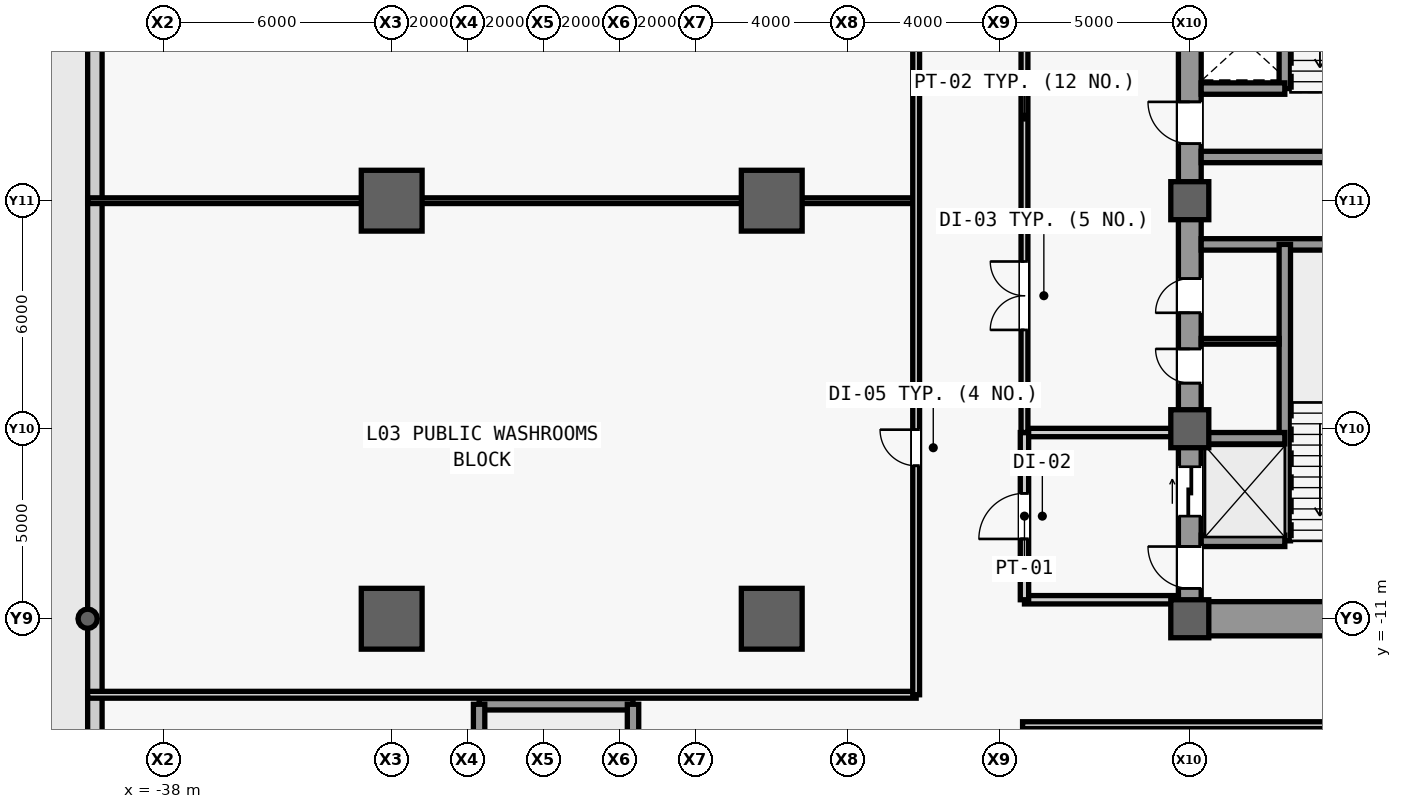
"""IFC4 building model, lengths in metres.
Left out: names, types, materials, properties, quantities, classifications, styles, units other than length and angle.
Written with IfcOpenShell. Run it as: python <this file> out.ifc"""

import sys

from ifc_helpers import new_model, si_unit, direction, frame, frame_2d, origin, origin_2d, place, context, subcontext, project, spatial, rectangle, hollow_circle, extrude, source, transform, mapped, element, fill, save


model = new_model("IFC4")
c1 = context("Model", 3, precision=1e-05, world=origin(), true_north=direction((0.0, 1.0)))
c2 = subcontext(c1, "Body", "Model", "MODEL_VIEW")
j1 = project(units=[si_unit("LENGTHUNIT", "METRE"), si_unit("PLANEANGLEUNIT", "RADIAN")], contexts=[c1])
p1 = place(None, origin())
s1 = spatial("IfcSite", under=j1, at=p1, CompositionType="ELEMENT")
p2 = place(p1, origin())
s2 = spatial("IfcBuilding", under=s1, at=p2, CompositionType="ELEMENT")
p3 = place(p2, frame((0.0, 0.0, 17.4)))
s3 = spatial("IfcBuildingStorey", under=s2, at=p3, CompositionType="ELEMENT", Elevation=17.4)
m1 = source(origin(), c2, "Body", "SweptSolid", [
    extrude(rectangle(XDim=22.0, YDim=0.6, at=frame_2d((11.0, 0.0))), origin(), (0.0, 0.0, 1.0), 4.48),
])
p4 = place(p3, frame((-11.0, -11.0, 0.0), z_axis=(0.0, 0.0, 1.0), x_axis=(0.0, 1.0, 0.0)))
e1 = element("IfcWall", 1, at=p4, inside=s3, PredefinedType="SHEAR", context=c2, shape_type="MappedRepresentation", body=[
    mapped(m1, transform((0.0, 0.0, 0.0), scale=1.0)),
])
m2 = source(origin(), c2, "Body", "SweptSolid", [
    extrude(rectangle(XDim=1.1, YDim=2.2, at=frame_2d((0.55, 1.1))), frame((0.0, 0.31, 0.0), z_axis=(0.0, -1.0, 0.0), x_axis=(1.0, 0.0, 0.0)), (0.0, 0.0, 1.0), 0.62),
])
p5 = place(p4, frame((0.8, 0.0, 0.0)))
e2 = element("IfcOpeningElement", 2, at=p5, cuts=e1, PredefinedType="OPENING", context=c2, shape_type="MappedRepresentation", body=[
    mapped(m2, transform((0.0, 0.0, 0.0), scale=1.0)),
])
p6 = place(p4, frame((12.5, 0.0, 0.0)))
e3 = element("IfcOpeningElement", 3, at=p6, cuts=e1, PredefinedType="OPENING", context=c2, shape_type="MappedRepresentation", body=[
    mapped(m2, transform((0.0, 0.0, 0.0), scale=1.0)),
])
m3 = source(origin(), c2, "Body", "SweptSolid", [
    extrude(rectangle(XDim=0.9, YDim=2.15, at=frame_2d((0.45, 1.075))), frame((0.0, 0.31, 0.0), z_axis=(0.0, -1.0, 0.0), x_axis=(1.0, 0.0, 0.0)), (0.0, 0.0, 1.0), 0.62),
])
p7 = place(p4, frame((6.2, 0.0, 0.0)))
e4 = element("IfcOpeningElement", 4, at=p7, cuts=e1, PredefinedType="OPENING", context=c2, shape_type="MappedRepresentation", body=[
    mapped(m3, transform((0.0, 0.0, 0.0), scale=1.0)),
])
p8 = place(p4, frame((8.05, 0.0, 0.0)))
e5 = element("IfcOpeningElement", 5, at=p8, cuts=e1, PredefinedType="OPENING", context=c2, shape_type="MappedRepresentation", body=[
    mapped(m3, transform((0.0, 0.0, 0.0), scale=1.0)),
])
m4 = source(origin(), c2, "Body", "SweptSolid", [
    extrude(rectangle(XDim=1.3, YDim=2.3, at=frame_2d((0.65, 1.15))), frame((0.0, 0.31, 0.0), z_axis=(0.0, -1.0, 0.0), x_axis=(1.0, 0.0, 0.0)), (0.0, 0.0, 1.0), 0.62),
])
p9 = place(p4, frame((2.7, 0.0, 0.0)))
e6 = element("IfcOpeningElement", 6, at=p9, cuts=e1, PredefinedType="OPENING", context=c2, shape_type="MappedRepresentation", body=[
    mapped(m4, transform((0.0, 0.0, 0.0), scale=1.0)),
])
m5 = source(origin(), c2, "Body", "SweptSolid", [
    extrude(rectangle(XDim=5.85, YDim=0.9, at=frame_2d((2.925, 0.0))), origin(), (0.0, 0.0, 1.0), 4.48),
])
p10 = place(p3, frame((-10.7, -11.0, 0.0), z_axis=(0.0, 0.0, 1.0), x_axis=(1.0, 0.0, 0.0)))
e7 = element("IfcWall", 7, at=p10, inside=s3, PredefinedType="SHEAR", context=c2, shape_type="MappedRepresentation", body=[
    mapped(m5, transform((0.0, 0.0, 0.0), scale=1.0)),
])
m6 = source(origin(), c2, "Body", "SweptSolid", [
    extrude(rectangle(XDim=5.6, YDim=0.3, at=frame_2d((2.8, 0.0))), origin(), (0.0, 0.0, 1.0), 4.48),
])
for number, where, z_axis, x_axis in (
    (8, (-10.7, -1.15, 0.0), (0.0, 0.0, 1.0), (1.0, 0.0, 0.0)),
    (9, (-10.7, 1.15, 0.0), (0.0, 0.0, 1.0), (1.0, 0.0, 0.0)),
):
    element("IfcWall", number, at=place(p3, frame(where, z_axis=z_axis, x_axis=x_axis)), inside=s3, PredefinedType="SHEAR", context=c2, shape_type="MappedRepresentation", body=[
        mapped(m6, transform((0.0, 0.0, 0.0), scale=1.0)),
    ])
m7 = source(origin(), c2, "Body", "SweptSolid", [
    extrude(hollow_circle(Radius=0.254, WallThickness=0.025, at=origin_2d()), origin(), (0.0, 0.0, 1.0), 4.8),
])
p11 = place(p3, frame((-40.0, -11.0, 0.0), z_axis=(0.0, 0.0, 1.0), x_axis=(1.0, 0.0, 0.0)))
e10 = element("IfcColumn", 10, at=p11, inside=s3, PredefinedType="COLUMN", context=c2, shape_type="MappedRepresentation", body=[
    mapped(m7, transform((0.0, 0.0, 0.0), scale=1.0)),
])
m8 = source(origin(), c2, "Body", "SweptSolid", [
    extrude(rectangle(XDim=1.6, YDim=1.6, at=origin_2d()), origin(), (0.0, 0.0, 1.0), 4.8),
])
for number, where, z_axis, x_axis in (
    (11, (-32.0, -11.0, 0.0), (0.0, 0.0, 1.0), (1.0, 0.0, 0.0)),
    (12, (-32.0, 0.0, 0.0), (0.0, 0.0, 1.0), (1.0, 0.0, 0.0)),
    (13, (-22.0, -11.0, 0.0), (0.0, 0.0, 1.0), (1.0, 0.0, 0.0)),
    (14, (-22.0, 0.0, 0.0), (0.0, 0.0, 1.0), (1.0, 0.0, 0.0)),
):
    element("IfcColumn", number, at=place(p3, frame(where, z_axis=z_axis, x_axis=x_axis)), inside=s3, PredefinedType="COLUMN", context=c2, shape_type="MappedRepresentation", body=[
        mapped(m8, transform((0.0, 0.0, 0.0), scale=1.0)),
    ])
m9 = source(origin(), c2, "Body", "SweptSolid", [
    extrude(rectangle(XDim=1.0, YDim=1.0, at=origin_2d()), origin(), (0.0, 0.0, 1.0), 4.8),
])
for number, where, z_axis, x_axis in (
    (15, (-11.0, -11.0, 0.0), (0.0, 0.0, 1.0), (1.0, 0.0, 0.0)),
    (16, (-11.0, -6.0, 0.0), (0.0, 0.0, 1.0), (1.0, 0.0, 0.0)),
    (17, (-11.0, 0.0, 0.0), (0.0, 0.0, 1.0), (1.0, 0.0, 0.0)),
):
    element("IfcColumn", number, at=place(p3, frame(where, z_axis=z_axis, x_axis=x_axis)), inside=s3, PredefinedType="COLUMN", context=c2, shape_type="MappedRepresentation", body=[
        mapped(m9, transform((0.0, 0.0, 0.0), scale=1.0)),
    ])
m10 = source(origin(), c2, "Body", "SweptSolid", [
    extrude(rectangle(XDim=69.24, YDim=0.38, at=frame_2d((34.62, 0.0))), origin(), (0.0, 0.0, 1.0), 2.68),
])
p12 = place(p3, frame((-39.81, -34.62, 0.0), z_axis=(0.0, 0.0, 1.0), x_axis=(0.0, 1.0, 0.0)))
e18 = element("IfcWall", 18, at=p12, inside=s3, PredefinedType="STANDARD", context=c2, shape_type="MappedRepresentation", body=[
    mapped(m10, transform((0.0, 0.0, 0.0), scale=1.0)),
])
m11 = source(origin(), c2, "Body", "SweptSolid", [
    extrude(rectangle(XDim=1.6, YDim=2.25, at=frame_2d((0.8, 1.125))), frame((0.0, 0.2, 0.0), z_axis=(0.0, -1.0, 0.0), x_axis=(1.0, 0.0, 0.0)), (0.0, 0.0, 1.0), 0.4),
])
p13 = place(p12, frame((39.82, 0.0, 0.0)))
e19 = element("IfcOpeningElement", 19, at=p13, cuts=e18, PredefinedType="OPENING", context=c2, shape_type="MappedRepresentation", body=[
    mapped(m11, transform((0.0, 0.0, 0.0), scale=1.0)),
])
m12 = source(origin(), c2, "Body", "SweptSolid", [
    extrude(rectangle(XDim=1.6, YDim=1.96, at=frame_2d((0.8, 0.98))), frame((0.0, 0.2, 0.0), z_axis=(0.0, -1.0, 0.0), x_axis=(1.0, 0.0, 0.0)), (0.0, 0.0, 1.0), 0.4),
])
p14 = place(p12, frame((16.51, 0.0, 0.5)))
e20 = element("IfcOpeningElement", 20, at=p14, cuts=e18, PredefinedType="OPENING", context=c2, shape_type="MappedRepresentation", body=[
    mapped(m12, transform((0.0, 0.0, 0.0), scale=1.0)),
])
p15 = place(p12, frame((51.13, 0.0, 0.5)))
e21 = element("IfcOpeningElement", 21, at=p15, cuts=e18, PredefinedType="OPENING", context=c2, shape_type="MappedRepresentation", body=[
    mapped(m12, transform((0.0, 0.0, 0.0), scale=1.0)),
])
m13 = source(origin(), c2, "Body", "SweptSolid", [
    extrude(rectangle(XDim=7.8, YDim=0.3, at=frame_2d((3.9, 0.0))), origin(), (0.0, 0.0, 1.0), 4.48),
])
p16 = place(p3, frame((-8.5, -8.95, 0.0), z_axis=(0.0, 0.0, 1.0), x_axis=(0.0, 1.0, 0.0)))
e22 = element("IfcWall", 22, at=p16, inside=s3, PredefinedType="SHEAR", context=c2, shape_type="MappedRepresentation", body=[
    mapped(m13, transform((0.0, 0.0, 0.0), scale=1.0)),
])
m14 = source(origin(), c2, "Body", "SweptSolid", [
    extrude(rectangle(XDim=2.2, YDim=0.3, at=frame_2d((1.1, 0.0))), origin(), (0.0, 0.0, 1.0), 4.48),
])
for number, where, z_axis, x_axis in (
    (23, (-10.7, -8.95, 0.0), (0.0, 0.0, 1.0), (1.0, 0.0, 0.0)),
    (24, (-10.7, -6.25, 0.0), (0.0, 0.0, 1.0), (1.0, 0.0, 0.0)),
):
    element("IfcWall", number, at=place(p3, frame(where, z_axis=z_axis, x_axis=x_axis)), inside=s3, PredefinedType="SHEAR", context=c2, shape_type="MappedRepresentation", body=[
        mapped(m14, transform((0.0, 0.0, 0.0), scale=1.0)),
    ])
m15 = source(origin(), c2, "Body", "SweptSolid", [
    extrude(rectangle(XDim=7.75, YDim=0.3, at=frame_2d((3.875, 0.0))), origin(), (0.0, 0.0, 1.0), 4.48),
])
p17 = place(p3, frame((-8.5, 2.95, 0.0), z_axis=(0.0, 0.0, 1.0), x_axis=(0.0, 1.0, 0.0)))
e25 = element("IfcWall", 25, at=p17, inside=s3, PredefinedType="SHEAR", context=c2, shape_type="MappedRepresentation", body=[
    mapped(m15, transform((0.0, 0.0, 0.0), scale=1.0)),
])
p18 = place(p3, frame((-10.7, 2.95, 0.0), z_axis=(0.0, 0.0, 1.0), x_axis=(1.0, 0.0, 0.0)))
e26 = element("IfcWall", 26, at=p18, inside=s3, PredefinedType="SHEAR", context=c2, shape_type="MappedRepresentation", body=[
    mapped(m14, transform((0.0, 0.0, 0.0), scale=1.0)),
])
m16 = source(origin(), c2, "Body", "SweptSolid", [
    extrude(rectangle(XDim=2.05, YDim=0.15, at=frame_2d((1.025, 0.0))), origin(), (0.0, 0.0, 1.0), 4.48),
])
p19 = place(p3, frame((-10.7, -3.7, 0.0), z_axis=(0.0, 0.0, 1.0), x_axis=(1.0, 0.0, 0.0)))
e27 = element("IfcWall", 27, at=p19, inside=s3, PredefinedType="PARTITIONING", context=c2, shape_type="MappedRepresentation", body=[
    mapped(m16, transform((0.0, 0.0, 0.0), scale=1.0)),
])
m17 = source(origin(), c2, "Body", "SweptSolid", [
    extrude(rectangle(XDim=4.05, YDim=0.22, at=frame_2d((2.025, 0.0))), origin(), (0.0, 0.0, 1.0), 4.48),
])
for number, where, z_axis, x_axis in (
    (28, (-15.35, -10.5, 0.0), (0.0, 0.0, 1.0), (1.0, 0.0, 0.0)),
    (29, (-15.35, -6.1, 0.0), (0.0, 0.0, 1.0), (1.0, 0.0, 0.0)),
):
    element("IfcWall", number, at=place(p3, frame(where, z_axis=z_axis, x_axis=x_axis)), inside=s3, PredefinedType="PARTITIONING", context=c2, shape_type="MappedRepresentation", body=[
        mapped(m17, transform((0.0, 0.0, 0.0), scale=1.0)),
    ])
m18 = source(origin(), c2, "Body", "SweptSolid", [
    extrude(rectangle(XDim=4.4, YDim=0.22, at=frame_2d((2.2, 0.0))), origin(), (0.0, 0.0, 1.0), 4.48),
])
p20 = place(p3, frame((-15.35, -10.5, 0.0), z_axis=(0.0, 0.0, 1.0), x_axis=(0.0, 1.0, 0.0)))
e30 = element("IfcWall", 30, at=p20, inside=s3, PredefinedType="PARTITIONING", context=c2, shape_type="MappedRepresentation", body=[
    mapped(m18, transform((0.0, 0.0, 0.0), scale=1.0)),
])
m19 = source(origin(), c2, "Body", "SweptSolid", [
    extrude(rectangle(XDim=1.2, YDim=2.2, at=frame_2d((0.6, 1.1))), frame((0.0, 0.12, 0.0), z_axis=(0.0, -1.0, 0.0), x_axis=(1.0, 0.0, 0.0)), (0.0, 0.0, 1.0), 0.24),
])
p21 = place(p20, frame((1.6, 0.0, 0.0)))
e31 = element("IfcOpeningElement", 31, at=p21, cuts=e30, PredefinedType="OPENING", context=c2, shape_type="MappedRepresentation", body=[
    mapped(m19, transform((0.0, 0.0, 0.0), scale=1.0)),
])
m20 = source(origin(), c2, "Body", "SweptSolid", [
    extrude(rectangle(XDim=16.6, YDim=0.18, at=frame_2d((8.3, 0.0))), origin(), (0.0, 0.0, 1.0), 4.48),
])
p22 = place(p3, frame((-15.35, -6.1, 0.0), z_axis=(0.0, 0.0, 1.0), x_axis=(0.0, 1.0, 0.0)))
e32 = element("IfcWall", 32, at=p22, inside=s3, PredefinedType="PARTITIONING", context=c2, shape_type="MappedRepresentation", body=[
    mapped(m20, transform((0.0, 0.0, 0.0), scale=1.0)),
])
m21 = source(origin(), c2, "Body", "SweptSolid", [
    extrude(rectangle(XDim=1.8, YDim=2.25, at=frame_2d((0.9, 1.125))), frame((0.0, 0.1, 0.0), z_axis=(0.0, -1.0, 0.0), x_axis=(1.0, 0.0, 0.0)), (0.0, 0.0, 1.0), 0.2),
])
p23 = place(p22, frame((2.7, 0.0, 0.0)))
e33 = element("IfcOpeningElement", 33, at=p23, cuts=e32, PredefinedType="OPENING", context=c2, shape_type="MappedRepresentation", body=[
    mapped(m21, transform((0.0, 0.0, 0.0), scale=1.0)),
])
p24 = place(p22, frame((11.0, 0.0, 0.0)))
e34 = element("IfcOpeningElement", 34, at=p24, cuts=e32, PredefinedType="OPENING", context=c2, shape_type="MappedRepresentation", body=[
    mapped(m21, transform((0.0, 0.0, 0.0), scale=1.0)),
])
m22 = source(origin(), c2, "Body", "SweptSolid", [
    extrude(rectangle(XDim=4.05, YDim=0.3, at=frame_2d((2.025, 0.0))), origin(), (0.0, 0.0, 1.0), 4.48),
])
p25 = place(p3, frame((-29.7, -13.25, 0.0), z_axis=(0.0, 0.0, 1.0), x_axis=(1.0, 0.0, 0.0)))
e35 = element("IfcWall", 35, at=p25, inside=s3, PredefinedType="SHEAR", context=c2, shape_type="MappedRepresentation", body=[
    mapped(m22, transform((0.0, 0.0, 0.0), scale=1.0)),
])
m23 = source(origin(), c2, "Body", "SweptSolid", [
    extrude(rectangle(XDim=10.5, YDim=0.3, at=frame_2d((5.25, 0.0))), origin(), (0.0, 0.0, 1.0), 4.48),
])
for number, where, z_axis, x_axis in (
    (36, (-29.7, -23.75, 0.0), (0.0, 0.0, 1.0), (0.0, 1.0, 0.0)),
    (37, (-25.65, -23.75, 0.0), (0.0, 0.0, 1.0), (0.0, 1.0, 0.0)),
):
    element("IfcWall", number, at=place(p3, frame(where, z_axis=z_axis, x_axis=x_axis)), inside=s3, PredefinedType="SHEAR", context=c2, shape_type="MappedRepresentation", body=[
        mapped(m23, transform((0.0, 0.0, 0.0), scale=1.0)),
    ])
m24 = source(origin(), c2, "Body", "SweptSolid", [
    extrude(rectangle(XDim=30.8, YDim=0.18, at=frame_2d((15.4, 0.0))), origin(), (0.0, 0.0, 1.0), 4.48),
])
p26 = place(p3, frame((-15.4, -13.8, 0.0), z_axis=(0.0, 0.0, 1.0), x_axis=(1.0, 0.0, 0.0)))
e38 = element("IfcWall", 38, at=p26, inside=s3, PredefinedType="PARTITIONING", context=c2, shape_type="MappedRepresentation", body=[
    mapped(m24, transform((0.0, 0.0, 0.0), scale=1.0)),
])
p27 = place(p26, frame((14.5, 0.0, 0.0)))
e39 = element("IfcOpeningElement", 39, at=p27, cuts=e38, PredefinedType="OPENING", context=c2, shape_type="MappedRepresentation", body=[
    mapped(m21, transform((0.0, 0.0, 0.0), scale=1.0)),
])
m25 = source(origin(), c2, "Body", "SweptSolid", [
    extrude(rectangle(XDim=21.8, YDim=0.18, at=frame_2d((10.9, 0.0))), origin(), (0.0, 0.0, 1.0), 4.48),
])
p28 = place(p3, frame((-40.0, -13.0, 0.0), z_axis=(0.0, 0.0, 1.0), x_axis=(1.0, 0.0, 0.0)))
e40 = element("IfcWall", 40, at=p28, inside=s3, PredefinedType="PARTITIONING", context=c2, shape_type="MappedRepresentation", body=[
    mapped(m25, transform((0.0, 0.0, 0.0), scale=1.0)),
])
m26 = source(origin(), c2, "Body", "SweptSolid", [
    extrude(rectangle(XDim=21.8, YDim=0.15, at=frame_2d((10.9, 0.0))), origin(), (0.0, 0.0, 1.0), 2.68),
])
p29 = place(p3, frame((-40.0, 0.0, 0.0), z_axis=(0.0, 0.0, 1.0), x_axis=(1.0, 0.0, 0.0)))
e41 = element("IfcWall", 41, at=p29, inside=s3, PredefinedType="PARTITIONING", context=c2, shape_type="MappedRepresentation", body=[
    mapped(m26, transform((0.0, 0.0, 0.0), scale=1.0)),
])
m27 = source(origin(), c2, "Body", "SweptSolid", [
    extrude(rectangle(XDim=24.3, YDim=0.18, at=frame_2d((12.15, 0.0))), origin(), (0.0, 0.0, 1.0), 4.48),
])
p30 = place(p3, frame((-18.2, -13.0, 0.0), z_axis=(0.0, 0.0, 1.0), x_axis=(0.0, 1.0, 0.0)))
e42 = element("IfcWall", 42, at=p30, inside=s3, PredefinedType="PARTITIONING", context=c2, shape_type="MappedRepresentation", body=[
    mapped(m27, transform((0.0, 0.0, 0.0), scale=1.0)),
])
m28 = source(origin(), c2, "Body", "SweptSolid", [
    extrude(rectangle(XDim=0.95, YDim=2.15, at=frame_2d((0.475, 1.075))), frame((0.0, 0.1, 0.0), z_axis=(0.0, -1.0, 0.0), x_axis=(1.0, 0.0, 0.0)), (0.0, 0.0, 1.0), 0.2),
])
p31 = place(p30, frame((6.025, 0.0, 0.0)))
e43 = element("IfcOpeningElement", 43, at=p31, cuts=e42, PredefinedType="OPENING", context=c2, shape_type="MappedRepresentation", body=[
    mapped(m28, transform((0.0, 0.0, 0.0), scale=1.0)),
])
p32 = place(p30, frame((18.175, 0.0, 0.0)))
e44 = element("IfcOpeningElement", 44, at=p32, cuts=e42, PredefinedType="OPENING", context=c2, shape_type="MappedRepresentation", body=[
    mapped(m28, transform((0.0, 0.0, 0.0), scale=1.0)),
])
m29 = source(origin(), c2, "Body", "SweptSolid", [
    extrude(rectangle(XDim=1.1, YDim=2.2, at=frame_2d((0.55, 1.1))), frame((0.0, 0.025, 0.0), z_axis=(0.0, -1.0, 0.0), x_axis=(1.0, 0.0, 0.0)), (0.0, 0.0, 1.0), 0.05),
])
p33 = place(p5, origin())
e45 = element("IfcDoor", 45, at=p33, inside=s3, OperationType="SINGLE_SWING_RIGHT", PredefinedType="DOOR", context=c2, shape_type="MappedRepresentation", body=[
    mapped(m29, transform((0.0, 0.0, 0.0), scale=1.0)),
])
fill(e2, e45)
p34 = place(p6, origin())
e46 = element("IfcDoor", 46, at=p34, inside=s3, OperationType="SINGLE_SWING_RIGHT", PredefinedType="DOOR", context=c2, shape_type="MappedRepresentation", body=[
    mapped(m29, transform((0.0, 0.0, 0.0), scale=1.0)),
])
fill(e3, e46)
m30 = source(origin(), c2, "Body", "SweptSolid", [
    extrude(rectangle(XDim=0.9, YDim=2.15, at=frame_2d((0.45, 1.075))), frame((0.0, 0.025, 0.0), z_axis=(0.0, -1.0, 0.0), x_axis=(1.0, 0.0, 0.0)), (0.0, 0.0, 1.0), 0.05),
])
p35 = place(p7, origin())
e47 = element("IfcDoor", 47, at=p35, inside=s3, OperationType="SINGLE_SWING_RIGHT", PredefinedType="DOOR", context=c2, shape_type="MappedRepresentation", body=[
    mapped(m30, transform((0.0, 0.0, 0.0), scale=1.0)),
])
fill(e4, e47)
p36 = place(p8, origin())
e48 = element("IfcDoor", 48, at=p36, inside=s3, OperationType="SINGLE_SWING_LEFT", PredefinedType="DOOR", context=c2, shape_type="MappedRepresentation", body=[
    mapped(m30, transform((0.0, 0.0, 0.0), scale=1.0)),
])
fill(e5, e48)
m31 = source(origin(), c2, "Body", "SweptSolid", [
    extrude(rectangle(XDim=1.2, YDim=2.2, at=frame_2d((0.6, 1.1))), frame((0.0, 0.025, 0.0), z_axis=(0.0, -1.0, 0.0), x_axis=(1.0, 0.0, 0.0)), (0.0, 0.0, 1.0), 0.05),
])
p37 = place(p21, origin())
e49 = element("IfcDoor", 49, at=p37, inside=s3, OperationType="SINGLE_SWING_LEFT", PredefinedType="DOOR", context=c2, shape_type="MappedRepresentation", body=[
    mapped(m31, transform((0.0, 0.0, 0.0), scale=1.0)),
])
fill(e31, e49)
m32 = source(origin(), c2, "Body", "SweptSolid", [
    extrude(rectangle(XDim=1.8, YDim=2.25, at=frame_2d((0.9, 1.125))), frame((0.0, 0.025, 0.0), z_axis=(0.0, -1.0, 0.0), x_axis=(1.0, 0.0, 0.0)), (0.0, 0.0, 1.0), 0.05),
])
p38 = place(p23, origin())
e50 = element("IfcDoor", 50, at=p38, inside=s3, OperationType="SINGLE_SWING_LEFT", PredefinedType="DOOR", context=c2, shape_type="MappedRepresentation", body=[
    mapped(m32, transform((0.0, 0.0, 0.0), scale=1.0)),
])
fill(e33, e50)
m33 = source(origin(), c2, "Body", "SweptSolid", [
    extrude(rectangle(XDim=0.95, YDim=2.15, at=frame_2d((0.475, 1.075))), frame((0.0, 0.025, 0.0), z_axis=(0.0, -1.0, 0.0), x_axis=(1.0, 0.0, 0.0)), (0.0, 0.0, 1.0), 0.05),
])
p39 = place(p31, origin())
e51 = element("IfcDoor", 51, at=p39, inside=s3, OperationType="SINGLE_SWING_RIGHT", PredefinedType="DOOR", context=c2, shape_type="MappedRepresentation", body=[
    mapped(m33, transform((0.0, 0.0, 0.0), scale=1.0)),
])
fill(e43, e51)
m34 = source(origin(), c2, "Body", "SweptSolid", [
    extrude(rectangle(XDim=1.3, YDim=2.3, at=frame_2d((0.65, 1.15))), frame((0.0, 0.025, 0.0), z_axis=(0.0, -1.0, 0.0), x_axis=(1.0, 0.0, 0.0)), (0.0, 0.0, 1.0), 0.05),
])
p40 = place(p9, origin())
e52 = element("IfcDoor", 52, at=p40, inside=s3, OperationType="SLIDING_TO_LEFT", PredefinedType="DOOR", context=c2, shape_type="MappedRepresentation", body=[
    mapped(m34, transform((0.0, 0.0, 0.0), scale=1.0)),
])
fill(e6, e52)
save(model, sys.argv[1])
